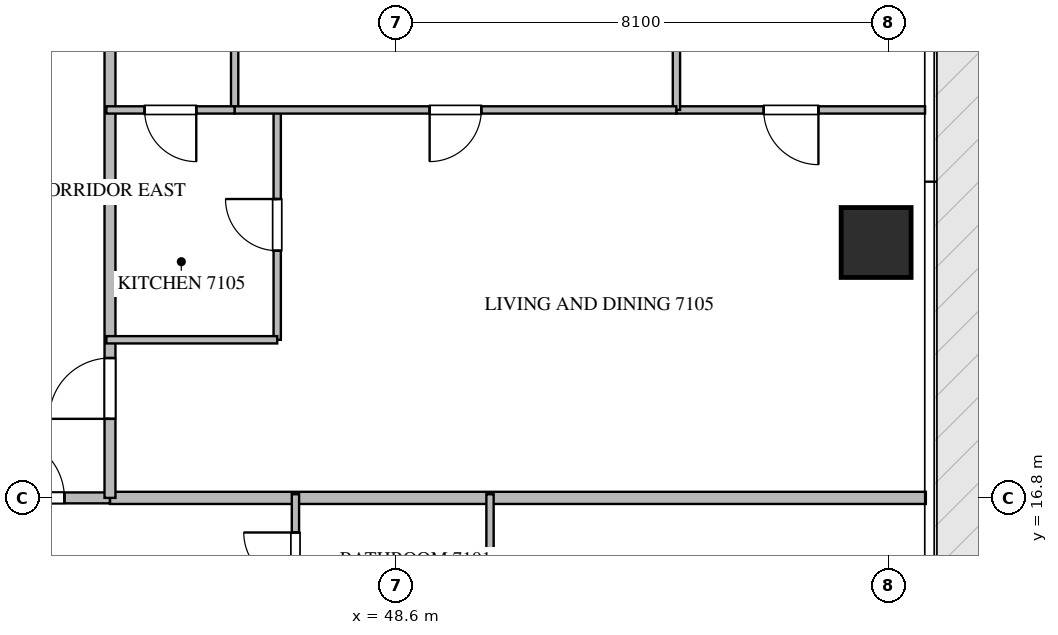
"""IFC4 building model, lengths in metres.
Left out: names, types, materials, properties, quantities, classifications, styles, units other than length and angle.
Written with IfcOpenShell. Run it as: python <this file> out.ifc"""

import sys

from ifc_helpers import new_model, si_unit, direction, frame, frame_2d, origin, origin_2d, place, context, subcontext, project, spatial, rectangle, extrude, source, transform, mapped, element, fill, save


model = new_model("IFC4")
c1 = context("Model", 3, precision=1e-05, world=origin(), true_north=direction((0.0, 1.0)))
c2 = subcontext(c1, "Body", "Model", "MODEL_VIEW")
j1 = project(units=[si_unit("LENGTHUNIT", "METRE"), si_unit("PLANEANGLEUNIT", "RADIAN")], contexts=[c1])
p1 = place(None, origin())
s1 = spatial("IfcSite", under=j1, at=p1, CompositionType="ELEMENT")
p2 = place(p1, origin())
s2 = spatial("IfcBuilding", under=s1, at=p2, CompositionType="ELEMENT")
p3 = place(p2, frame((0.0, 0.0, 283.6)))
s3 = spatial("IfcBuildingStorey", under=s2, at=p3, CompositionType="ELEMENT", Elevation=283.6)
m1 = source(origin(), c2, "Body", "SweptSolid", [
    extrude(rectangle(XDim=1.15, YDim=1.15, at=origin_2d()), origin(), (0.0, 0.0, 1.0), 3.67),
])
p4 = place(p3, frame((56.5, 21.0, -0.26), z_axis=(0.0, 0.0, 1.0), x_axis=(1.0, 0.0, 0.0)))
e1 = element("IfcColumn", 1, at=p4, inside=s3, PredefinedType="COLUMN", context=c2, shape_type="MappedRepresentation", body=[
    mapped(m1, transform((0.0, 0.0, 0.0), scale=1.0)),
])
p5 = place(p3, frame((43.9, 16.8, 0.0), z_axis=(0.0, 0.0, 1.0), x_axis=(1.0, 0.0, 0.0)))
e2 = element("IfcWall", 2, at=p5, inside=s3, PredefinedType="PARTITIONING", context=c2, shape_type="SweptSolid", body=[
    extrude(rectangle(XDim=13.418, YDim=0.2, at=frame_2d((6.709, 0.0))), origin(), (0.0, 0.0, 1.0), 3.41),
])
p6 = place(p3, frame((41.402, 16.8, 0.0), z_axis=(0.0, 0.0, 1.0), x_axis=(1.0, 0.0, 0.0)))
e3 = element("IfcWall", 3, at=p6, inside=s3, PredefinedType="PARTITIONING", context=c2, shape_type="SweptSolid", body=[
    extrude(rectangle(XDim=2.496, YDim=0.18, at=frame_2d((1.248, 0.0))), origin(), (0.0, 0.0, 1.0), 3.41),
])
p7 = place(p6, frame((0.748, 0.0, 0.0)))
e4 = element("IfcOpeningElement", 4, at=p7, cuts=e3, PredefinedType="OPENING", context=c2, shape_type="SweptSolid", body=[
    extrude(rectangle(XDim=1.0, YDim=2.15, at=frame_2d((0.5, 1.075))), frame((0.0, 0.1, 0.0), z_axis=(0.0, -1.0, 0.0), x_axis=(1.0, 0.0, 0.0)), (0.0, 0.0, 1.0), 0.2),
])
p8 = place(p3, frame((43.9, 16.8, 0.0), z_axis=(0.0, 0.0, 1.0), x_axis=(0.0, 1.0, 0.0)))
e5 = element("IfcWall", 5, at=p8, inside=s3, PredefinedType="PARTITIONING", context=c2, shape_type="SweptSolid", body=[
    extrude(rectangle(XDim=16.8, YDim=0.18, at=frame_2d((8.4, 0.0))), origin(), (0.0, 0.0, 1.0), 3.41),
])
p9 = place(p8, frame((1.3, 0.0, 0.0)))
e6 = element("IfcOpeningElement", 6, at=p9, cuts=e5, PredefinedType="OPENING", context=c2, shape_type="SweptSolid", body=[
    extrude(rectangle(XDim=1.0, YDim=2.15, at=frame_2d((0.5, 1.075))), frame((0.0, 0.1, 0.0), z_axis=(0.0, -1.0, 0.0), x_axis=(1.0, 0.0, 0.0)), (0.0, 0.0, 1.0), 0.2),
])
p10 = place(p3, frame((50.15, 14.75, 0.0), z_axis=(0.0, 0.0, 1.0), x_axis=(0.0, 1.0, 0.0)))
e7 = element("IfcWall", 7, at=p10, inside=s3, PredefinedType="PARTITIONING", context=c2, shape_type="SweptSolid", body=[
    extrude(rectangle(XDim=2.11, YDim=0.12, at=frame_2d((1.055, 0.0))), origin(), (0.0, 0.0, 1.0), 3.41),
])
p11 = place(p3, frame((46.95, 14.752, 0.0), z_axis=(0.0, 0.0, 1.0), x_axis=(0.0, 1.0, 0.0)))
e8 = element("IfcWall", 8, at=p11, inside=s3, PredefinedType="PARTITIONING", context=c2, shape_type="SweptSolid", body=[
    extrude(rectangle(XDim=2.108, YDim=0.12, at=frame_2d((1.054, 0.0))), origin(), (0.0, 0.0, 1.0), 3.41),
])
p12 = place(p11, frame((0.629, 0.0, 0.0)))
e9 = element("IfcOpeningElement", 9, at=p12, cuts=e8, PredefinedType="OPENING", context=c2, shape_type="SweptSolid", body=[
    extrude(rectangle(XDim=0.85, YDim=2.1, at=frame_2d((0.425, 1.05))), frame((0.0, 0.07, 0.0), z_axis=(0.0, -1.0, 0.0), x_axis=(1.0, 0.0, 0.0)), (0.0, 0.0, 1.0), 0.14),
])
p13 = place(p3, frame((46.65, 19.4, 0.0), z_axis=(0.0, 0.0, 1.0), x_axis=(0.0, 1.0, 0.0)))
e10 = element("IfcWall", 10, at=p13, inside=s3, PredefinedType="PARTITIONING", context=c2, shape_type="SweptSolid", body=[
    extrude(rectangle(XDim=3.78, YDim=0.12, at=frame_2d((1.89, 0.0))), origin(), (0.0, 0.0, 1.0), 3.41),
])
p14 = place(p13, frame((1.465, 0.0, 0.0)))
e11 = element("IfcOpeningElement", 11, at=p14, cuts=e10, PredefinedType="OPENING", context=c2, shape_type="SweptSolid", body=[
    extrude(rectangle(XDim=0.85, YDim=2.1, at=frame_2d((0.425, 1.05))), frame((0.0, 0.07, 0.0), z_axis=(0.0, -1.0, 0.0), x_axis=(1.0, 0.0, 0.0)), (0.0, 0.0, 1.0), 0.14),
])
p15 = place(p3, frame((46.65, 19.4, 0.0), z_axis=(0.0, 0.0, 1.0), x_axis=(-1.0, 0.0, 0.0)))
e12 = element("IfcWall", 12, at=p15, inside=s3, PredefinedType="PARTITIONING", context=c2, shape_type="SweptSolid", body=[
    extrude(rectangle(XDim=2.81, YDim=0.12, at=frame_2d((1.405, 0.0))), origin(), (0.0, 0.0, 1.0), 3.41),
])
p16 = place(p3, frame((57.305, 23.18, 0.0), z_axis=(0.0, 0.0, 1.0), x_axis=(-1.0, 0.0, 0.0)))
e13 = element("IfcWall", 13, at=p16, inside=s3, PredefinedType="PARTITIONING", context=c2, shape_type="SweptSolid", body=[
    extrude(rectangle(XDim=4.089, YDim=0.12, at=frame_2d((2.044, 0.0))), origin(), (0.0, 0.0, 1.0), 3.41),
])
p17 = place(p16, frame((1.754, 0.0, 0.0)))
e14 = element("IfcOpeningElement", 14, at=p17, cuts=e13, PredefinedType="OPENING", context=c2, shape_type="SweptSolid", body=[
    extrude(rectangle(XDim=0.9, YDim=2.1, at=frame_2d((0.45, 1.05))), frame((0.0, 0.07, 0.0), z_axis=(0.0, -1.0, 0.0), x_axis=(1.0, 0.0, 0.0)), (0.0, 0.0, 1.0), 0.14),
])
p18 = place(p3, frame((53.216, 23.18, 0.0), z_axis=(0.0, 0.0, 1.0), x_axis=(0.0, 1.0, 0.0)))
e15 = element("IfcWall", 15, at=p18, inside=s3, PredefinedType="PARTITIONING", context=c2, shape_type="SweptSolid", body=[
    extrude(rectangle(XDim=10.48, YDim=0.12, at=frame_2d((5.24, 0.0))), origin(), (0.0, 0.0, 1.0), 3.41),
])
p19 = place(p3, frame((45.95, 23.18, 0.0), z_axis=(0.0, 0.0, 1.0), x_axis=(0.0, 1.0, 0.0)))
e16 = element("IfcWall", 16, at=p19, inside=s3, PredefinedType="PARTITIONING", context=c2, shape_type="SweptSolid", body=[
    extrude(rectangle(XDim=3.2, YDim=0.12, at=frame_2d((1.6, 0.0))), origin(), (0.0, 0.0, 1.0), 3.41),
])
p20 = place(p3, frame((53.214, 23.18, 0.0), z_axis=(0.0, 0.0, 1.0), x_axis=(-1.0, 0.0, 0.0)))
e17 = element("IfcWall", 17, at=p20, inside=s3, PredefinedType="PARTITIONING", context=c2, shape_type="SweptSolid", body=[
    extrude(rectangle(XDim=7.264, YDim=0.12, at=frame_2d((3.632, 0.0))), origin(), (0.0, 0.0, 1.0), 3.41),
])
p21 = place(p20, frame((3.207, 0.0, 0.0)))
e18 = element("IfcOpeningElement", 18, at=p21, cuts=e17, PredefinedType="OPENING", context=c2, shape_type="SweptSolid", body=[
    extrude(rectangle(XDim=0.85, YDim=2.1, at=frame_2d((0.425, 1.05))), frame((0.0, 0.07, 0.0), z_axis=(0.0, -1.0, 0.0), x_axis=(1.0, 0.0, 0.0)), (0.0, 0.0, 1.0), 0.14),
])
p22 = place(p3, frame((45.948, 23.18, 0.0), z_axis=(0.0, 0.0, 1.0), x_axis=(-1.0, 0.0, 0.0)))
e19 = element("IfcWall", 19, at=p22, inside=s3, PredefinedType="PARTITIONING", context=c2, shape_type="SweptSolid", body=[
    extrude(rectangle(XDim=2.108, YDim=0.12, at=frame_2d((1.054, 0.0))), origin(), (0.0, 0.0, 1.0), 3.41),
])
p23 = place(p22, frame((0.629, 0.0, 0.0)))
e20 = element("IfcOpeningElement", 20, at=p23, cuts=e19, PredefinedType="OPENING", context=c2, shape_type="SweptSolid", body=[
    extrude(rectangle(XDim=0.85, YDim=2.1, at=frame_2d((0.425, 1.05))), frame((0.0, 0.07, 0.0), z_axis=(0.0, -1.0, 0.0), x_axis=(1.0, 0.0, 0.0)), (0.0, 0.0, 1.0), 0.14),
])
m2 = source(origin(), c2, "Body", "SweptSolid", [
    extrude(rectangle(XDim=1.0, YDim=2.15, at=frame_2d((0.5, 1.075))), frame((0.0, 0.025, 0.0), z_axis=(0.0, -1.0, 0.0), x_axis=(1.0, 0.0, 0.0)), (0.0, 0.0, 1.0), 0.05),
])
p24 = place(p7, origin())
e21 = element("IfcDoor", 21, at=p24, inside=s3, OperationType="SINGLE_SWING_LEFT", PredefinedType="DOOR", context=c2, shape_type="MappedRepresentation", body=[
    mapped(m2, transform((0.0, 0.0, 0.0), scale=1.0)),
])
fill(e4, e21)
p25 = place(p9, origin())
e22 = element("IfcDoor", 22, at=p25, inside=s3, OperationType="SINGLE_SWING_LEFT", PredefinedType="DOOR", context=c2, shape_type="MappedRepresentation", body=[
    mapped(m2, transform((0.0, 0.0, 0.0), scale=1.0)),
])
fill(e6, e22)
m3 = source(origin(), c2, "Body", "SweptSolid", [
    extrude(rectangle(XDim=0.85, YDim=2.1, at=frame_2d((0.425, 1.05))), frame((0.0, 0.025, 0.0), z_axis=(0.0, -1.0, 0.0), x_axis=(1.0, 0.0, 0.0)), (0.0, 0.0, 1.0), 0.05),
])
p26 = place(p12, origin())
e23 = element("IfcDoor", 23, at=p26, inside=s3, OperationType="SINGLE_SWING_RIGHT", PredefinedType="DOOR", context=c2, shape_type="MappedRepresentation", body=[
    mapped(m3, transform((0.0, 0.0, 0.0), scale=1.0)),
])
fill(e9, e23)
p27 = place(p14, origin())
e24 = element("IfcDoor", 24, at=p27, inside=s3, OperationType="SINGLE_SWING_RIGHT", PredefinedType="DOOR", context=c2, shape_type="MappedRepresentation", body=[
    mapped(m3, transform((0.0, 0.0, 0.0), scale=1.0)),
])
fill(e11, e24)
m4 = source(origin(), c2, "Body", "SweptSolid", [
    extrude(rectangle(XDim=0.9, YDim=2.1, at=frame_2d((0.45, 1.05))), frame((0.0, 0.025, 0.0), z_axis=(0.0, -1.0, 0.0), x_axis=(1.0, 0.0, 0.0)), (0.0, 0.0, 1.0), 0.05),
])
p28 = place(p17, origin())
e25 = element("IfcDoor", 25, at=p28, inside=s3, OperationType="SINGLE_SWING_LEFT", PredefinedType="DOOR", context=c2, shape_type="MappedRepresentation", body=[
    mapped(m4, transform((0.0, 0.0, 0.0), scale=1.0)),
])
fill(e14, e25)
p29 = place(p21, origin())
e26 = element("IfcDoor", 26, at=p29, inside=s3, OperationType="SINGLE_SWING_RIGHT", PredefinedType="DOOR", context=c2, shape_type="MappedRepresentation", body=[
    mapped(m3, transform((0.0, 0.0, 0.0), scale=1.0)),
])
fill(e18, e26)
p30 = place(p23, origin())
e27 = element("IfcDoor", 27, at=p30, inside=s3, OperationType="SINGLE_SWING_LEFT", PredefinedType="DOOR", context=c2, shape_type="MappedRepresentation", body=[
    mapped(m3, transform((0.0, 0.0, 0.0), scale=1.0)),
])
fill(e20, e27)
save(model, sys.argv[1])
